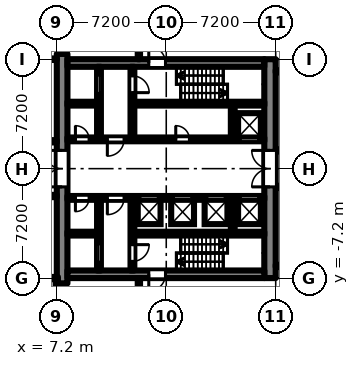
"""IFC4 building model, lengths in metres.
Left out: names, types, materials, properties, quantities, classifications, styles, units other than length and angle.
Written with IfcOpenShell. Run it as: python <this file> out.ifc"""

import sys

from ifc_helpers import new_model, si_unit, direction, frame, frame_2d, origin, place, context, subcontext, project, spatial, rectangle, extrude, element, fill, save


model = new_model("IFC4")
c1 = context("Model", 3, precision=1e-05, world=origin(), true_north=direction((0.0, 1.0)))
c2 = subcontext(c1, "Body", "Model", "MODEL_VIEW")
j1 = project(units=[si_unit("LENGTHUNIT", "METRE"), si_unit("PLANEANGLEUNIT", "RADIAN")], contexts=[c1])
p1 = place(None, origin())
s1 = spatial("IfcSite", under=j1, at=p1, CompositionType="ELEMENT")
p2 = place(p1, origin())
s2 = spatial("IfcBuilding", under=s1, at=p2, CompositionType="ELEMENT")
p3 = place(p2, origin())
s3 = spatial("IfcBuildingStorey", under=s2, at=p3, CompositionType="ELEMENT", Elevation=0.0)
p4 = place(p3, frame((7.55, -7.548, 0.0), z_axis=(0.0, 0.0, 1.0), x_axis=(0.0, 1.0, 0.0)))
e1 = element("IfcWall", 1, at=p4, inside=s3, PredefinedType="SHEAR", context=c2, shape_type="SweptSolid", body=[
    extrude(rectangle(XDim=15.096, YDim=0.7, at=frame_2d((7.548, 0.0))), origin(), (0.0, 0.0, 1.0), 6.6),
])
p5 = place(p4, frame((6.348, 0.0, 0.0)))
e2 = element("IfcOpeningElement", 2, at=p5, cuts=e1, PredefinedType="OPENING", context=c2, shape_type="SweptSolid", body=[
    extrude(rectangle(XDim=2.4, YDim=2.2, at=frame_2d((1.2, 1.1))), frame((0.0, 0.36, 0.0), z_axis=(0.0, -1.0, 0.0), x_axis=(1.0, 0.0, 0.0)), (0.0, 0.0, 1.0), 0.72),
])
p6 = place(p3, frame((21.225, -7.2, 0.0), z_axis=(0.0, 0.0, 1.0), x_axis=(0.0, 1.0, 0.0)))
e3 = element("IfcWall", 3, at=p6, inside=s3, PredefinedType="SHEAR", context=c2, shape_type="SweptSolid", body=[
    extrude(rectangle(XDim=14.4, YDim=0.75, at=frame_2d((7.2, 0.0))), origin(), (0.0, 0.0, 1.0), 6.6),
])
p7 = place(p6, frame((6.0, 0.0, 0.0)))
e4 = element("IfcOpeningElement", 4, at=p7, cuts=e3, PredefinedType="OPENING", context=c2, shape_type="SweptSolid", body=[
    extrude(rectangle(XDim=2.4, YDim=2.2, at=frame_2d((1.2, 1.1))), frame((0.0, 0.385, 0.0), z_axis=(0.0, -1.0, 0.0), x_axis=(1.0, 0.0, 0.0)), (0.0, 0.0, 1.0), 0.77),
])
p8 = place(p3, frame((7.9, 6.95, 0.0), z_axis=(0.0, 0.0, 1.0), x_axis=(1.0, 0.0, 0.0)))
e5 = element("IfcWall", 5, at=p8, inside=s3, PredefinedType="SHEAR", context=c2, shape_type="SweptSolid", body=[
    extrude(rectangle(XDim=12.95, YDim=0.5, at=frame_2d((6.475, 0.0))), origin(), (0.0, 0.0, 1.0), 6.6),
])
p9 = place(p8, frame((5.35, 0.0, 0.0)))
e6 = element("IfcOpeningElement", 6, at=p9, cuts=e5, PredefinedType="OPENING", context=c2, shape_type="SweptSolid", body=[
    extrude(rectangle(XDim=1.1, YDim=2.1, at=frame_2d((0.55, 1.05))), frame((0.0, 0.26, 0.0), z_axis=(0.0, -1.0, 0.0), x_axis=(1.0, 0.0, 0.0)), (0.0, 0.0, 1.0), 0.52),
])
p10 = place(p3, frame((7.9, 1.925, 0.0), z_axis=(0.0, 0.0, 1.0), x_axis=(1.0, 0.0, 0.0)))
e7 = element("IfcWall", 7, at=p10, inside=s3, PredefinedType="SHEAR", context=c2, shape_type="SweptSolid", body=[
    extrude(rectangle(XDim=12.95, YDim=0.25, at=frame_2d((6.475, 0.0))), origin(), (0.0, 0.0, 1.0), 6.6),
])
p11 = place(p10, frame((11.425, 0.0, 0.0)))
e8 = element("IfcOpeningElement", 8, at=p11, cuts=e7, PredefinedType="OPENING", context=c2, shape_type="SweptSolid", body=[
    extrude(rectangle(XDim=1.1, YDim=2.1, at=frame_2d((0.55, 1.05))), frame((0.0, 0.135, 0.0), z_axis=(0.0, -1.0, 0.0), x_axis=(1.0, 0.0, 0.0)), (0.0, 0.0, 1.0), 0.27),
])
p12 = place(p10, frame((0.525, 0.0, 0.0)))
e9 = element("IfcOpeningElement", 9, at=p12, cuts=e7, PredefinedType="OPENING", context=c2, shape_type="SweptSolid", body=[
    extrude(rectangle(XDim=0.9, YDim=2.1, at=frame_2d((0.45, 1.05))), frame((0.0, 0.135, 0.0), z_axis=(0.0, -1.0, 0.0), x_axis=(1.0, 0.0, 0.0)), (0.0, 0.0, 1.0), 0.27),
])
p13 = place(p10, frame((2.625, 0.0, 0.0)))
e10 = element("IfcOpeningElement", 10, at=p13, cuts=e7, PredefinedType="OPENING", context=c2, shape_type="SweptSolid", body=[
    extrude(rectangle(XDim=1.1, YDim=2.1, at=frame_2d((0.55, 1.05))), frame((0.0, 0.135, 0.0), z_axis=(0.0, -1.0, 0.0), x_axis=(1.0, 0.0, 0.0)), (0.0, 0.0, 1.0), 0.27),
])
p14 = place(p10, frame((7.125, 0.0, 0.0)))
e11 = element("IfcOpeningElement", 11, at=p14, cuts=e7, PredefinedType="OPENING", context=c2, shape_type="SweptSolid", body=[
    extrude(rectangle(XDim=0.9, YDim=2.1, at=frame_2d((0.45, 1.05))), frame((0.0, 0.135, 0.0), z_axis=(0.0, -1.0, 0.0), x_axis=(1.0, 0.0, 0.0)), (0.0, 0.0, 1.0), 0.27),
])
p15 = place(p3, frame((7.9, 4.275, 0.0), z_axis=(0.0, 0.0, 1.0), x_axis=(1.0, 0.0, 0.0)))
e12 = element("IfcWall", 12, at=p15, inside=s3, PredefinedType="SHEAR", context=c2, shape_type="SweptSolid", body=[
    extrude(rectangle(XDim=1.95, YDim=0.25, at=frame_2d((0.975, 0.0))), origin(), (0.0, 0.0, 1.0), 6.6),
])
p16 = place(p3, frame((12.3, 4.275, 0.0), z_axis=(0.0, 0.0, 1.0), x_axis=(1.0, 0.0, 0.0)))
e13 = element("IfcWall", 13, at=p16, inside=s3, PredefinedType="SHEAR", context=c2, shape_type="SweptSolid", body=[
    extrude(rectangle(XDim=8.55, YDim=0.25, at=frame_2d((4.275, 0.0))), origin(), (0.0, 0.0, 1.0), 6.6),
])
p17 = place(p3, frame((9.975, 2.05, 0.0), z_axis=(0.0, 0.0, 1.0), x_axis=(0.0, 1.0, 0.0)))
e14 = element("IfcWall", 14, at=p17, inside=s3, PredefinedType="SHEAR", context=c2, shape_type="SweptSolid", body=[
    extrude(rectangle(XDim=4.65, YDim=0.25, at=frame_2d((2.325, 0.0))), origin(), (0.0, 0.0, 1.0), 6.6),
])
p18 = place(p17, frame((2.95, 0.0, 0.0)))
e15 = element("IfcOpeningElement", 15, at=p18, cuts=e14, PredefinedType="OPENING", context=c2, shape_type="SweptSolid", body=[
    extrude(rectangle(XDim=1.1, YDim=2.1, at=frame_2d((0.55, 1.05))), frame((0.0, 0.135, 0.0), z_axis=(0.0, -1.0, 0.0), x_axis=(1.0, 0.0, 0.0)), (0.0, 0.0, 1.0), 0.27),
])
p19 = place(p3, frame((12.175, 2.05, 0.0), z_axis=(0.0, 0.0, 1.0), x_axis=(0.0, 1.0, 0.0)))
e16 = element("IfcWall", 16, at=p19, inside=s3, PredefinedType="SHEAR", context=c2, shape_type="SweptSolid", body=[
    extrude(rectangle(XDim=4.65, YDim=0.25, at=frame_2d((2.325, 0.0))), origin(), (0.0, 0.0, 1.0), 6.6),
])
p20 = place(p19, frame((2.95, 0.0, 0.0)))
e17 = element("IfcOpeningElement", 17, at=p20, cuts=e16, PredefinedType="OPENING", context=c2, shape_type="SweptSolid", body=[
    extrude(rectangle(XDim=1.1, YDim=2.1, at=frame_2d((0.55, 1.05))), frame((0.0, 0.135, 0.0), z_axis=(0.0, -1.0, 0.0), x_axis=(1.0, 0.0, 0.0)), (0.0, 0.0, 1.0), 0.27),
])
p21 = place(p3, frame((18.775, 2.05, 0.0), z_axis=(0.0, 0.0, 1.0), x_axis=(0.0, 1.0, 0.0)))
e18 = element("IfcWall", 18, at=p21, inside=s3, PredefinedType="PARTITIONING", context=c2, shape_type="SweptSolid", body=[
    extrude(rectangle(XDim=2.1, YDim=0.25, at=frame_2d((1.05, 0.0))), origin(), (0.0, 0.0, 1.0), 6.6),
])
p22 = place(p3, frame((7.9, -6.95, 0.0), z_axis=(0.0, 0.0, 1.0), x_axis=(1.0, 0.0, 0.0)))
e19 = element("IfcWall", 19, at=p22, inside=s3, PredefinedType="SHEAR", context=c2, shape_type="SweptSolid", body=[
    extrude(rectangle(XDim=12.95, YDim=0.5, at=frame_2d((6.475, 0.0))), origin(), (0.0, 0.0, 1.0), 6.6),
])
p23 = place(p22, frame((5.35, 0.0, 0.0)))
e20 = element("IfcOpeningElement", 20, at=p23, cuts=e19, PredefinedType="OPENING", context=c2, shape_type="SweptSolid", body=[
    extrude(rectangle(XDim=1.1, YDim=2.1, at=frame_2d((0.55, 1.05))), frame((0.0, 0.26, 0.0), z_axis=(0.0, -1.0, 0.0), x_axis=(1.0, 0.0, 0.0)), (0.0, 0.0, 1.0), 0.52),
])
p24 = place(p3, frame((7.9, -1.925, 0.0), z_axis=(0.0, 0.0, 1.0), x_axis=(1.0, 0.0, 0.0)))
e21 = element("IfcWall", 21, at=p24, inside=s3, PredefinedType="SHEAR", context=c2, shape_type="SweptSolid", body=[
    extrude(rectangle(XDim=12.95, YDim=0.25, at=frame_2d((6.475, 0.0))), origin(), (0.0, 0.0, 1.0), 6.6),
])
p25 = place(p24, frame((4.825, 0.0, 0.0)))
e22 = element("IfcOpeningElement", 22, at=p25, cuts=e21, PredefinedType="OPENING", context=c2, shape_type="SweptSolid", body=[
    extrude(rectangle(XDim=1.1, YDim=2.1, at=frame_2d((0.55, 1.05))), frame((0.0, 0.135, 0.0), z_axis=(0.0, -1.0, 0.0), x_axis=(1.0, 0.0, 0.0)), (0.0, 0.0, 1.0), 0.27),
])
p26 = place(p24, frame((7.025, 0.0, 0.0)))
e23 = element("IfcOpeningElement", 23, at=p26, cuts=e21, PredefinedType="OPENING", context=c2, shape_type="SweptSolid", body=[
    extrude(rectangle(XDim=1.1, YDim=2.1, at=frame_2d((0.55, 1.05))), frame((0.0, 0.135, 0.0), z_axis=(0.0, -1.0, 0.0), x_axis=(1.0, 0.0, 0.0)), (0.0, 0.0, 1.0), 0.27),
])
p27 = place(p24, frame((9.225, 0.0, 0.0)))
e24 = element("IfcOpeningElement", 24, at=p27, cuts=e21, PredefinedType="OPENING", context=c2, shape_type="SweptSolid", body=[
    extrude(rectangle(XDim=1.1, YDim=2.1, at=frame_2d((0.55, 1.05))), frame((0.0, 0.135, 0.0), z_axis=(0.0, -1.0, 0.0), x_axis=(1.0, 0.0, 0.0)), (0.0, 0.0, 1.0), 0.27),
])
p28 = place(p24, frame((11.425, 0.0, 0.0)))
e25 = element("IfcOpeningElement", 25, at=p28, cuts=e21, PredefinedType="OPENING", context=c2, shape_type="SweptSolid", body=[
    extrude(rectangle(XDim=1.1, YDim=2.1, at=frame_2d((0.55, 1.05))), frame((0.0, 0.135, 0.0), z_axis=(0.0, -1.0, 0.0), x_axis=(1.0, 0.0, 0.0)), (0.0, 0.0, 1.0), 0.27),
])
p29 = place(p24, frame((0.525, 0.0, 0.0)))
e26 = element("IfcOpeningElement", 26, at=p29, cuts=e21, PredefinedType="OPENING", context=c2, shape_type="SweptSolid", body=[
    extrude(rectangle(XDim=0.9, YDim=2.1, at=frame_2d((0.45, 1.05))), frame((0.0, 0.135, 0.0), z_axis=(0.0, -1.0, 0.0), x_axis=(1.0, 0.0, 0.0)), (0.0, 0.0, 1.0), 0.27),
])
p30 = place(p24, frame((2.625, 0.0, 0.0)))
e27 = element("IfcOpeningElement", 27, at=p30, cuts=e21, PredefinedType="OPENING", context=c2, shape_type="SweptSolid", body=[
    extrude(rectangle(XDim=1.1, YDim=2.1, at=frame_2d((0.55, 1.05))), frame((0.0, 0.135, 0.0), z_axis=(0.0, -1.0, 0.0), x_axis=(1.0, 0.0, 0.0)), (0.0, 0.0, 1.0), 0.27),
])
p31 = place(p3, frame((7.9, -4.275, 0.0), z_axis=(0.0, 0.0, 1.0), x_axis=(1.0, 0.0, 0.0)))
e28 = element("IfcWall", 28, at=p31, inside=s3, PredefinedType="SHEAR", context=c2, shape_type="SweptSolid", body=[
    extrude(rectangle(XDim=1.95, YDim=0.25, at=frame_2d((0.975, 0.0))), origin(), (0.0, 0.0, 1.0), 6.6),
])
p32 = place(p3, frame((12.3, -4.275, 0.0), z_axis=(0.0, 0.0, 1.0), x_axis=(1.0, 0.0, 0.0)))
e29 = element("IfcWall", 29, at=p32, inside=s3, PredefinedType="SHEAR", context=c2, shape_type="SweptSolid", body=[
    extrude(rectangle(XDim=8.55, YDim=0.25, at=frame_2d((4.275, 0.0))), origin(), (0.0, 0.0, 1.0), 6.6),
])
p33 = place(p3, frame((9.975, -2.05, 0.0), z_axis=(0.0, 0.0, 1.0), x_axis=(0.0, -1.0, 0.0)))
e30 = element("IfcWall", 30, at=p33, inside=s3, PredefinedType="SHEAR", context=c2, shape_type="SweptSolid", body=[
    extrude(rectangle(XDim=4.65, YDim=0.25, at=frame_2d((2.325, 0.0))), origin(), (0.0, 0.0, 1.0), 6.6),
])
p34 = place(p33, frame((2.95, 0.0, 0.0)))
e31 = element("IfcOpeningElement", 31, at=p34, cuts=e30, PredefinedType="OPENING", context=c2, shape_type="SweptSolid", body=[
    extrude(rectangle(XDim=1.1, YDim=2.1, at=frame_2d((0.55, 1.05))), frame((0.0, 0.135, 0.0), z_axis=(0.0, -1.0, 0.0), x_axis=(1.0, 0.0, 0.0)), (0.0, 0.0, 1.0), 0.27),
])
p35 = place(p3, frame((12.175, -2.05, 0.0), z_axis=(0.0, 0.0, 1.0), x_axis=(0.0, -1.0, 0.0)))
e32 = element("IfcWall", 32, at=p35, inside=s3, PredefinedType="SHEAR", context=c2, shape_type="SweptSolid", body=[
    extrude(rectangle(XDim=4.65, YDim=0.25, at=frame_2d((2.325, 0.0))), origin(), (0.0, 0.0, 1.0), 6.6),
])
p36 = place(p35, frame((2.95, 0.0, 0.0)))
e33 = element("IfcOpeningElement", 33, at=p36, cuts=e32, PredefinedType="OPENING", context=c2, shape_type="SweptSolid", body=[
    extrude(rectangle(XDim=1.1, YDim=2.1, at=frame_2d((0.55, 1.05))), frame((0.0, 0.135, 0.0), z_axis=(0.0, -1.0, 0.0), x_axis=(1.0, 0.0, 0.0)), (0.0, 0.0, 1.0), 0.27),
])
p37 = place(p3, frame((18.775, -2.05, 0.0), z_axis=(0.0, 0.0, 1.0), x_axis=(0.0, -1.0, 0.0)))
e34 = element("IfcWall", 34, at=p37, inside=s3, PredefinedType="PARTITIONING", context=c2, shape_type="SweptSolid", body=[
    extrude(rectangle(XDim=2.1, YDim=0.25, at=frame_2d((1.05, 0.0))), origin(), (0.0, 0.0, 1.0), 6.6),
])
p38 = place(p3, frame((-1.8, -7.2, 0.0), z_axis=(0.0, 0.0, 1.0), x_axis=(1.0, 0.0, 0.0)))
e35 = element("IfcWall", 35, at=p38, inside=s3, PredefinedType="PARTITIONING", context=c2, shape_type="SweptSolid", body=[
    extrude(rectangle(XDim=8.925, YDim=0.15, at=frame_2d((4.462, 0.0))), origin(), (0.0, 0.0, 1.0), 6.6),
])
p39 = place(p3, frame((1.875, -1.8, 0.0), z_axis=(0.0, 0.0, 1.0), x_axis=(1.0, 0.0, 0.0)))
e36 = element("IfcWall", 36, at=p39, inside=s3, PredefinedType="PARTITIONING", context=c2, shape_type="SweptSolid", body=[
    extrude(rectangle(XDim=5.325, YDim=0.15, at=frame_2d((2.663, 0.0))), origin(), (0.0, 0.0, 1.0), 6.6),
])
p40 = place(p39, frame((0.1, 0.0, 0.0)))
e37 = element("IfcOpeningElement", 37, at=p40, cuts=e36, PredefinedType="OPENING", context=c2, shape_type="SweptSolid", body=[
    extrude(rectangle(XDim=0.9, YDim=2.1, at=frame_2d((0.45, 1.05))), frame((0.0, 0.085, 0.0), z_axis=(0.0, -1.0, 0.0), x_axis=(1.0, 0.0, 0.0)), (0.0, 0.0, 1.0), 0.17),
])
p41 = place(p3, frame((1.875, 1.8, 0.0), z_axis=(0.0, 0.0, 1.0), x_axis=(1.0, 0.0, 0.0)))
e38 = element("IfcWall", 38, at=p41, inside=s3, PredefinedType="PARTITIONING", context=c2, shape_type="SweptSolid", body=[
    extrude(rectangle(XDim=5.325, YDim=0.15, at=frame_2d((2.663, 0.0))), origin(), (0.0, 0.0, 1.0), 6.6),
])
p42 = place(p3, frame((5.1, 7.2, 0.0), z_axis=(0.0, 0.0, 1.0), x_axis=(1.0, 0.0, 0.0)))
e39 = element("IfcWall", 39, at=p42, inside=s3, PredefinedType="PARTITIONING", context=c2, shape_type="SweptSolid", body=[
    extrude(rectangle(XDim=2.1, YDim=0.1, at=frame_2d((1.05, 0.0))), origin(), (0.0, 0.0, 1.0), 6.6),
])
p43 = place(p3, frame((7.2, -12.518, 0.0), z_axis=(0.0, 0.0, 1.0), x_axis=(0.0, 1.0, 0.0)))
e40 = element("IfcWall", 40, at=p43, inside=s3, PredefinedType="PARTITIONING", context=c2, shape_type="SweptSolid", body=[
    extrude(rectangle(XDim=5.393, YDim=0.15, at=frame_2d((2.697, 0.0))), origin(), (0.0, 0.0, 1.0), 6.3),
])
for number, where, z_axis, x_axis in (
    (41, (12.6, -10.325, 0.0), (0.0, 0.0, 1.0), (0.0, 1.0, 0.0)),
    (42, (12.6, 7.2, 0.0), (0.0, 0.0, 1.0), (0.0, 1.0, 0.0)),
):
    element("IfcWall", number, at=place(p3, frame(where, z_axis=z_axis, x_axis=x_axis)), inside=s3, PredefinedType="PARTITIONING", context=c2, shape_type="SweptSolid", body=[
        extrude(rectangle(XDim=3.125, YDim=0.15, at=frame_2d((1.562, 0.0))), origin(), (0.0, 0.0, 1.0), 6.6),
    ])
p44 = place(p3, frame((21.6, -6.4, 0.0), z_axis=(0.0, 0.0, 1.0), x_axis=(1.0, 0.0, 0.0)))
e43 = element("IfcWall", 43, at=p44, inside=s3, PredefinedType="PARTITIONING", context=c2, shape_type="SweptSolid", body=[
    extrude(rectangle(XDim=28.62, YDim=0.15, at=frame_2d((14.31, 0.0))), origin(), (0.0, 0.0, 1.0), 6.6),
])
p45 = place(p44, frame((9.8, 0.0, 0.0)))
e44 = element("IfcOpeningElement", 44, at=p45, cuts=e43, PredefinedType="OPENING", context=c2, shape_type="SweptSolid", body=[
    extrude(rectangle(XDim=2.0, YDim=2.1, at=frame_2d((1.0, 1.05))), frame((0.0, 0.085, 0.0), z_axis=(0.0, -1.0, 0.0), x_axis=(1.0, 0.0, 0.0)), (0.0, 0.0, 1.0), 0.17),
])
for number, where, z_axis, x_axis in (
    (45, (21.6, -1.2, 0.0), (0.0, 0.0, 1.0), (1.0, 0.0, 0.0)),
    (46, (21.6, 1.2, 0.0), (0.0, 0.0, 1.0), (1.0, 0.0, 0.0)),
):
    element("IfcWall", number, at=place(p3, frame(where, z_axis=z_axis, x_axis=x_axis)), inside=s3, PredefinedType="PARTITIONING", context=c2, shape_type="SweptSolid", body=[
        extrude(rectangle(XDim=9.525, YDim=0.15, at=frame_2d((4.762, 0.0))), origin(), (0.0, 0.0, 1.0), 6.6),
    ])
p46 = place(p3, frame((21.6, 6.4, 0.0), z_axis=(0.0, 0.0, 1.0), x_axis=(1.0, 0.0, 0.0)))
e47 = element("IfcWall", 47, at=p46, inside=s3, PredefinedType="PARTITIONING", context=c2, shape_type="SweptSolid", body=[
    extrude(rectangle(XDim=28.62, YDim=0.15, at=frame_2d((14.31, 0.0))), origin(), (0.0, 0.0, 1.0), 6.6),
])
p47 = place(p46, frame((9.8, 0.0, 0.0)))
e48 = element("IfcOpeningElement", 48, at=p47, cuts=e47, PredefinedType="OPENING", context=c2, shape_type="SweptSolid", body=[
    extrude(rectangle(XDim=2.0, YDim=2.1, at=frame_2d((1.0, 1.05))), frame((0.0, 0.085, 0.0), z_axis=(0.0, -1.0, 0.0), x_axis=(1.0, 0.0, 0.0)), (0.0, 0.0, 1.0), 0.17),
])
p48 = place(p25, origin())
e49 = element("IfcDoor", 49, at=p48, inside=s3, OperationType="SLIDING_TO_LEFT", PredefinedType="DOOR", context=c2, shape_type="SweptSolid", body=[
    extrude(rectangle(XDim=1.1, YDim=2.1, at=frame_2d((0.55, 1.05))), frame((0.0, 0.025, 0.0), z_axis=(0.0, -1.0, 0.0), x_axis=(1.0, 0.0, 0.0)), (0.0, 0.0, 1.0), 0.05),
])
fill(e22, e49)
p49 = place(p26, origin())
e50 = element("IfcDoor", 50, at=p49, inside=s3, OperationType="SLIDING_TO_LEFT", PredefinedType="DOOR", context=c2, shape_type="SweptSolid", body=[
    extrude(rectangle(XDim=1.1, YDim=2.1, at=frame_2d((0.55, 1.05))), frame((0.0, 0.025, 0.0), z_axis=(0.0, -1.0, 0.0), x_axis=(1.0, 0.0, 0.0)), (0.0, 0.0, 1.0), 0.05),
])
fill(e23, e50)
p50 = place(p27, origin())
e51 = element("IfcDoor", 51, at=p50, inside=s3, OperationType="SLIDING_TO_LEFT", PredefinedType="DOOR", context=c2, shape_type="SweptSolid", body=[
    extrude(rectangle(XDim=1.1, YDim=2.1, at=frame_2d((0.55, 1.05))), frame((0.0, 0.025, 0.0), z_axis=(0.0, -1.0, 0.0), x_axis=(1.0, 0.0, 0.0)), (0.0, 0.0, 1.0), 0.05),
])
fill(e24, e51)
p51 = place(p28, origin())
e52 = element("IfcDoor", 52, at=p51, inside=s3, OperationType="SLIDING_TO_LEFT", PredefinedType="DOOR", context=c2, shape_type="SweptSolid", body=[
    extrude(rectangle(XDim=1.1, YDim=2.1, at=frame_2d((0.55, 1.05))), frame((0.0, 0.025, 0.0), z_axis=(0.0, -1.0, 0.0), x_axis=(1.0, 0.0, 0.0)), (0.0, 0.0, 1.0), 0.05),
])
fill(e25, e52)
p52 = place(p11, origin())
e53 = element("IfcDoor", 53, at=p52, inside=s3, OperationType="SLIDING_TO_LEFT", PredefinedType="DOOR", context=c2, shape_type="SweptSolid", body=[
    extrude(rectangle(XDim=1.1, YDim=2.1, at=frame_2d((0.55, 1.05))), frame((0.0, 0.025, 0.0), z_axis=(0.0, -1.0, 0.0), x_axis=(1.0, 0.0, 0.0)), (0.0, 0.0, 1.0), 0.05),
])
fill(e8, e53)
p53 = place(p18, origin())
e54 = element("IfcDoor", 54, at=p53, inside=s3, OperationType="SLIDING_TO_LEFT", PredefinedType="DOOR", context=c2, shape_type="SweptSolid", body=[
    extrude(rectangle(XDim=1.1, YDim=2.1, at=frame_2d((0.55, 1.05))), frame((0.0, 0.025, 0.0), z_axis=(0.0, -1.0, 0.0), x_axis=(1.0, 0.0, 0.0)), (0.0, 0.0, 1.0), 0.05),
])
fill(e15, e54)
p54 = place(p34, origin())
e55 = element("IfcDoor", 55, at=p54, inside=s3, OperationType="SLIDING_TO_LEFT", PredefinedType="DOOR", context=c2, shape_type="SweptSolid", body=[
    extrude(rectangle(XDim=1.1, YDim=2.1, at=frame_2d((0.55, 1.05))), frame((0.0, 0.025, 0.0), z_axis=(0.0, -1.0, 0.0), x_axis=(1.0, 0.0, 0.0)), (0.0, 0.0, 1.0), 0.05),
])
fill(e31, e55)
p55 = place(p20, frame((1.1, 0.0, 0.0), z_axis=(0.0, 0.0, 1.0), x_axis=(-1.0, 0.0, 0.0)))
e56 = element("IfcDoor", 56, at=p55, inside=s3, OperationType="SINGLE_SWING_RIGHT", PredefinedType="DOOR", context=c2, shape_type="SweptSolid", body=[
    extrude(rectangle(XDim=1.1, YDim=2.1, at=frame_2d((0.55, 1.05))), frame((0.0, 0.025, 0.0), z_axis=(0.0, -1.0, 0.0), x_axis=(1.0, 0.0, 0.0)), (0.0, 0.0, 1.0), 0.05),
])
fill(e17, e56)
p56 = place(p36, origin())
e57 = element("IfcDoor", 57, at=p56, inside=s3, OperationType="SINGLE_SWING_LEFT", PredefinedType="DOOR", context=c2, shape_type="SweptSolid", body=[
    extrude(rectangle(XDim=1.1, YDim=2.1, at=frame_2d((0.55, 1.05))), frame((0.0, 0.025, 0.0), z_axis=(0.0, -1.0, 0.0), x_axis=(1.0, 0.0, 0.0)), (0.0, 0.0, 1.0), 0.05),
])
fill(e33, e57)
p57 = place(p12, origin())
e58 = element("IfcDoor", 58, at=p57, inside=s3, OperationType="SINGLE_SWING_LEFT", PredefinedType="DOOR", context=c2, shape_type="SweptSolid", body=[
    extrude(rectangle(XDim=0.9, YDim=2.1, at=frame_2d((0.45, 1.05))), frame((0.0, 0.025, 0.0), z_axis=(0.0, -1.0, 0.0), x_axis=(1.0, 0.0, 0.0)), (0.0, 0.0, 1.0), 0.05),
])
fill(e9, e58)
p58 = place(p29, frame((0.9, 0.0, 0.0), z_axis=(0.0, 0.0, 1.0), x_axis=(-1.0, 0.0, 0.0)))
e59 = element("IfcDoor", 59, at=p58, inside=s3, OperationType="SINGLE_SWING_RIGHT", PredefinedType="DOOR", context=c2, shape_type="SweptSolid", body=[
    extrude(rectangle(XDim=0.9, YDim=2.1, at=frame_2d((0.45, 1.05))), frame((0.0, 0.025, 0.0), z_axis=(0.0, -1.0, 0.0), x_axis=(1.0, 0.0, 0.0)), (0.0, 0.0, 1.0), 0.05),
])
fill(e26, e59)
p59 = place(p13, frame((1.1, 0.0, 0.0), z_axis=(0.0, 0.0, 1.0), x_axis=(-1.0, 0.0, 0.0)))
e60 = element("IfcDoor", 60, at=p59, inside=s3, OperationType="SINGLE_SWING_RIGHT", PredefinedType="DOOR", context=c2, shape_type="SweptSolid", body=[
    extrude(rectangle(XDim=1.1, YDim=2.1, at=frame_2d((0.55, 1.05))), frame((0.0, 0.025, 0.0), z_axis=(0.0, -1.0, 0.0), x_axis=(1.0, 0.0, 0.0)), (0.0, 0.0, 1.0), 0.05),
])
fill(e10, e60)
p60 = place(p30, frame((1.1, 0.0, 0.0), z_axis=(0.0, 0.0, 1.0), x_axis=(-1.0, 0.0, 0.0)))
e61 = element("IfcDoor", 61, at=p60, inside=s3, OperationType="SINGLE_SWING_RIGHT", PredefinedType="DOOR", context=c2, shape_type="SweptSolid", body=[
    extrude(rectangle(XDim=1.1, YDim=2.1, at=frame_2d((0.55, 1.05))), frame((0.0, 0.025, 0.0), z_axis=(0.0, -1.0, 0.0), x_axis=(1.0, 0.0, 0.0)), (0.0, 0.0, 1.0), 0.05),
])
fill(e27, e61)
p61 = place(p5, origin())
e62 = element("IfcDoor", 62, at=p61, inside=s3, OperationType="DOUBLE_DOOR_DOUBLE_SWING", PredefinedType="DOOR", context=c2, shape_type="SweptSolid", body=[
    extrude(rectangle(XDim=2.4, YDim=2.2, at=frame_2d((1.2, 1.1))), frame((0.0, 0.025, 0.0), z_axis=(0.0, -1.0, 0.0), x_axis=(1.0, 0.0, 0.0)), (0.0, 0.0, 1.0), 0.05),
])
fill(e2, e62)
p62 = place(p7, origin())
e63 = element("IfcDoor", 63, at=p62, inside=s3, OperationType="DOUBLE_DOOR_DOUBLE_SWING", PredefinedType="DOOR", context=c2, shape_type="SweptSolid", body=[
    extrude(rectangle(XDim=2.4, YDim=2.2, at=frame_2d((1.2, 1.1))), frame((0.0, 0.025, 0.0), z_axis=(0.0, -1.0, 0.0), x_axis=(1.0, 0.0, 0.0)), (0.0, 0.0, 1.0), 0.05),
])
fill(e4, e63)
p63 = place(p14, origin())
e64 = element("IfcDoor", 64, at=p63, inside=s3, OperationType="SINGLE_SWING_LEFT", PredefinedType="DOOR", context=c2, shape_type="SweptSolid", body=[
    extrude(rectangle(XDim=0.9, YDim=2.1, at=frame_2d((0.45, 1.05))), frame((0.0, 0.025, 0.0), z_axis=(0.0, -1.0, 0.0), x_axis=(1.0, 0.0, 0.0)), (0.0, 0.0, 1.0), 0.05),
])
fill(e11, e64)
p64 = place(p9, origin())
e65 = element("IfcDoor", 65, at=p64, inside=s3, OperationType="SINGLE_SWING_LEFT", PredefinedType="DOOR", context=c2, shape_type="SweptSolid", body=[
    extrude(rectangle(XDim=1.1, YDim=2.1, at=frame_2d((0.55, 1.05))), frame((0.0, 0.025, 0.0), z_axis=(0.0, -1.0, 0.0), x_axis=(1.0, 0.0, 0.0)), (0.0, 0.0, 1.0), 0.05),
])
fill(e6, e65)
p65 = place(p23, frame((1.1, 0.0, 0.0), z_axis=(0.0, 0.0, 1.0), x_axis=(-1.0, 0.0, 0.0)))
e66 = element("IfcDoor", 66, at=p65, inside=s3, OperationType="SINGLE_SWING_RIGHT", PredefinedType="DOOR", context=c2, shape_type="SweptSolid", body=[
    extrude(rectangle(XDim=1.1, YDim=2.1, at=frame_2d((0.55, 1.05))), frame((0.0, 0.025, 0.0), z_axis=(0.0, -1.0, 0.0), x_axis=(1.0, 0.0, 0.0)), (0.0, 0.0, 1.0), 0.05),
])
fill(e20, e66)
save(model, sys.argv[1])
